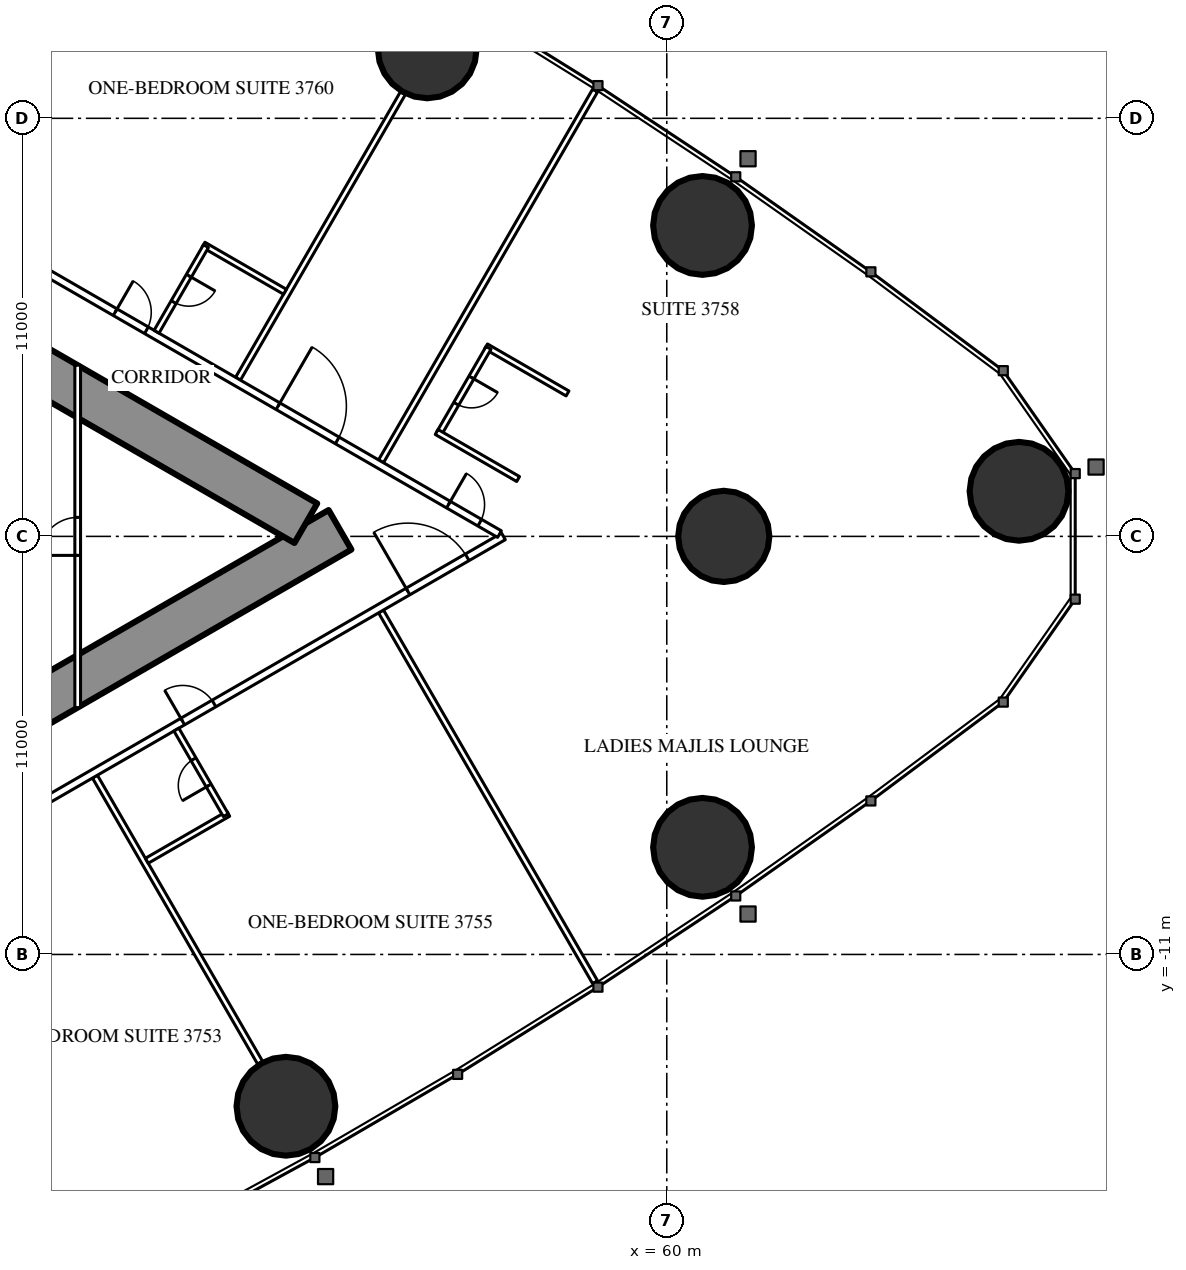
"""IFC4 building model, lengths in metres.
Left out: names, types, materials, properties, quantities, classifications, styles, units other than length and angle.
Written with IfcOpenShell. Run it as: python <this file> out.ifc"""

import sys

from ifc_helpers import new_model, si_unit, direction, frame, frame_2d, origin, origin_2d, place, context, subcontext, project, spatial, rectangle, circle, hollow_circle, extrude, element, fill, save


model = new_model("IFC4")
c1 = context("Model", 3, precision=1e-05, world=origin(), true_north=direction((0.0, 1.0)))
c2 = subcontext(c1, "Body", "Model", "MODEL_VIEW")
j1 = project(units=[si_unit("LENGTHUNIT", "METRE"), si_unit("PLANEANGLEUNIT", "RADIAN")], contexts=[c1])
p1 = place(None, origin())
s1 = spatial("IfcSite", under=j1, at=p1, CompositionType="ELEMENT")
p2 = place(p1, origin())
s2 = spatial("IfcBuilding", under=s1, at=p2, CompositionType="ELEMENT")
p3 = place(p2, frame((0.0, 0.0, 139.6)))
s3 = spatial("IfcBuildingStorey", under=s2, at=p3, CompositionType="ELEMENT", Elevation=139.6)
for number, where, z_axis, x_axis in (
    (1, (69.269, 1.187, 0.0), (0.0, 0.0, 1.0), (1.0, 0.0, 0.0)),
    (2, (60.941, 8.181, 0.0), (0.0, 0.0, 1.0), (1.0, 0.0, 0.0)),
    (3, (53.697, 12.827, 0.0), (0.0, 0.0, 1.0), (1.0, 0.0, 0.0)),
    (4, (49.979, -14.994, 0.0), (0.0, 0.0, 1.0), (1.0, 0.0, 0.0)),
    (5, (60.941, -8.181, 0.0), (0.0, 0.0, 1.0), (1.0, 0.0, 0.0)),
):
    element("IfcColumn", number, at=place(p3, frame(where, z_axis=z_axis, x_axis=x_axis)), inside=s3, PredefinedType="COLUMN", context=c2, shape_type="SweptSolid", body=[
        extrude(hollow_circle(Radius=1.3, WallThickness=0.1, at=origin_2d()), origin(), (0.0, 0.0, 1.0), 3.5),
    ])
p4 = place(p3, frame((61.5, 0.0, 0.0), z_axis=(0.0, 0.0, 1.0), x_axis=(1.0, 0.0, 0.0)))
e6 = element("IfcColumn", 6, at=p4, inside=s3, PredefinedType="COLUMN", context=c2, shape_type="SweptSolid", body=[
    extrude(circle(Radius=1.2, at=origin_2d()), origin(), (0.0, 0.0, 1.0), 3.5),
])
p5 = place(p3, frame((27.2, -13.8, 0.0), z_axis=(0.0, 0.0, 1.0), x_axis=(0.866027159892, 0.499996958321, 0.0)))
e7 = element("IfcWall", 7, at=p5, inside=s3, PredefinedType="SHEAR", context=c2, shape_type="SweptSolid", body=[
    extrude(rectangle(XDim=27.947, YDim=1.2, at=frame_2d((13.973, 0.0))), origin(), (0.0, 0.0, 1.0), 3.5),
])
p6 = place(p5, frame((4.6, 0.0, 0.0)))
e8 = element("IfcOpeningElement", 8, at=p6, cuts=e7, PredefinedType="OPENING", context=c2, shape_type="SweptSolid", body=[
    extrude(rectangle(XDim=1.0, YDim=2.2, at=frame_2d((0.5, 1.1))), frame((0.0, 0.61, 0.0), z_axis=(0.0, -1.0, 0.0), x_axis=(1.0, 0.0, 0.0)), (0.0, 0.0, 1.0), 1.22),
])
p7 = place(p5, frame((13.395, 0.0, 0.0)))
e9 = element("IfcOpeningElement", 9, at=p7, cuts=e7, PredefinedType="OPENING", context=c2, shape_type="SweptSolid", body=[
    extrude(rectangle(XDim=1.8, YDim=2.2, at=frame_2d((0.9, 1.1))), frame((0.0, 0.61, 0.0), z_axis=(0.0, -1.0, 0.0), x_axis=(1.0, 0.0, 0.0)), (0.0, 0.0, 1.0), 1.22),
])
p8 = place(p3, frame((27.2, 13.8, 0.0), z_axis=(0.0, 0.0, 1.0), x_axis=(0.866024515034, -0.500001539357, 0.0)))
e10 = element("IfcWall", 10, at=p8, inside=s3, PredefinedType="SHEAR", context=c2, shape_type="SweptSolid", body=[
    extrude(rectangle(XDim=26.907, YDim=1.2, at=frame_2d((13.454, 0.0))), origin(), (0.0, 0.0, 1.0), 3.5),
])
p9 = place(p8, frame((4.6, 0.0, 0.0)))
e11 = element("IfcOpeningElement", 11, at=p9, cuts=e10, PredefinedType="OPENING", context=c2, shape_type="SweptSolid", body=[
    extrude(rectangle(XDim=1.0, YDim=2.2, at=frame_2d((0.5, 1.1))), frame((0.0, 0.61, 0.0), z_axis=(0.0, -1.0, 0.0), x_axis=(1.0, 0.0, 0.0)), (0.0, 0.0, 1.0), 1.22),
])
p10 = place(p8, frame((13.395, 0.0, 0.0)))
e12 = element("IfcOpeningElement", 12, at=p10, cuts=e10, PredefinedType="OPENING", context=c2, shape_type="SweptSolid", body=[
    extrude(rectangle(XDim=1.8, YDim=2.2, at=frame_2d((0.9, 1.1))), frame((0.0, 0.61, 0.0), z_axis=(0.0, -1.0, 0.0), x_axis=(1.0, 0.0, 0.0)), (0.0, 0.0, 1.0), 1.22),
])
p11 = place(p3, frame((44.954, -6.321, 0.0), z_axis=(0.0, 0.0, 1.0), x_axis=(0.500018676722, -0.866014620505, 0.0)))
e13 = element("IfcWall", 13, at=p11, inside=s3, PredefinedType="PARTITIONING", context=c2, shape_type="SweptSolid", body=[
    extrude(rectangle(XDim=8.704, YDim=0.15, at=frame_2d((4.352, 0.0))), origin(), (0.0, 0.0, 1.0), 2.2),
])
p12 = place(p3, frame((52.481, -1.975, 0.0), z_axis=(0.0, 0.0, 1.0), x_axis=(0.500003867771, -0.866023170714, 0.0)))
e14 = element("IfcWall", 14, at=p12, inside=s3, PredefinedType="PARTITIONING", context=c2, shape_type="SweptSolid", body=[
    extrude(rectangle(XDim=11.265, YDim=0.15, at=frame_2d((5.632, 0.0))), origin(), (0.0, 0.0, 1.0), 3.25),
])
p13 = place(p3, frame((41.19, 8.494, 0.0), z_axis=(0.0, 0.0, 1.0), x_axis=(0.49999258054, 0.866029687369, 0.0)))
e15 = element("IfcWall", 15, at=p13, inside=s3, PredefinedType="PARTITIONING", context=c2, shape_type="SweptSolid", body=[
    extrude(rectangle(XDim=11.318, YDim=0.15, at=frame_2d((5.659, 0.0))), origin(), (0.0, 0.0, 1.0), 3.25),
])
p14 = place(p3, frame((48.719, 4.147, 0.0), z_axis=(0.0, 0.0, 1.0), x_axis=(0.499993328235, 0.866029255696, 0.0)))
e16 = element("IfcWall", 16, at=p14, inside=s3, PredefinedType="PARTITIONING", context=c2, shape_type="SweptSolid", body=[
    extrude(rectangle(XDim=8.686, YDim=0.15, at=frame_2d((4.343, 0.0))), origin(), (0.0, 0.0, 1.0), 2.2),
])
p15 = place(p3, frame((52.481, 1.975, 0.0), z_axis=(0.0, 0.0, 1.0), x_axis=(0.500003867771, 0.866023170714, 0.0)))
e17 = element("IfcWall", 17, at=p15, inside=s3, PredefinedType="PARTITIONING", context=c2, shape_type="SweptSolid", body=[
    extrude(rectangle(XDim=11.265, YDim=0.15, at=frame_2d((5.632, 0.0))), origin(), (0.0, 0.0, 1.0), 3.25),
])
p16 = place(p3, frame((37.96, -10.243, 0.0), z_axis=(0.0, 0.0, 1.0), x_axis=(0.866026429433, 0.499998223521, 0.0)))
e18 = element("IfcWall", 18, at=p16, inside=s3, PredefinedType="PARTITIONING", context=c2, shape_type="SweptSolid", body=[
    extrude(rectangle(XDim=20.487, YDim=0.2, at=frame_2d((10.243, 0.0))), origin(), (0.0, 0.0, 1.0), 3.25),
])
p17 = place(p16, frame((10.743, 0.0, 0.0)))
e19 = element("IfcOpeningElement", 19, at=p17, cuts=e18, PredefinedType="OPENING", context=c2, shape_type="SweptSolid", body=[
    extrude(rectangle(XDim=0.95, YDim=2.2, at=frame_2d((0.475, 1.1))), frame((0.0, 0.11, 0.0), z_axis=(0.0, -1.0, 0.0), x_axis=(1.0, 0.0, 0.0)), (0.0, 0.0, 1.0), 0.22),
])
p18 = place(p16, frame((17.586, 0.0, 0.0)))
e20 = element("IfcOpeningElement", 20, at=p18, cuts=e18, PredefinedType="OPENING", context=c2, shape_type="SweptSolid", body=[
    extrude(rectangle(XDim=1.8, YDim=2.2, at=frame_2d((0.9, 1.1))), frame((0.0, 0.11, 0.0), z_axis=(0.0, -1.0, 0.0), x_axis=(1.0, 0.0, 0.0)), (0.0, 0.0, 1.0), 0.22),
])
p19 = place(p16, frame((0.6, 0.0, 0.0)))
e21 = element("IfcOpeningElement", 21, at=p19, cuts=e18, PredefinedType="OPENING", context=c2, shape_type="SweptSolid", body=[
    extrude(rectangle(XDim=0.95, YDim=2.2, at=frame_2d((0.475, 1.1))), frame((0.0, 0.11, 0.0), z_axis=(0.0, -1.0, 0.0), x_axis=(1.0, 0.0, 0.0)), (0.0, 0.0, 1.0), 0.22),
])
p20 = place(p3, frame((36.834, 10.894, 0.0), z_axis=(0.0, 0.0, 1.0), x_axis=(0.866028157229, -0.499995230863, 0.0)))
e22 = element("IfcWall", 22, at=p20, inside=s3, PredefinedType="PARTITIONING", context=c2, shape_type="SweptSolid", body=[
    extrude(rectangle(XDim=21.667, YDim=0.2, at=frame_2d((10.833, 0.0))), origin(), (0.0, 0.0, 1.0), 3.25),
])
p21 = place(p20, frame((20.117, 0.0, 0.0)))
e23 = element("IfcOpeningElement", 23, at=p21, cuts=e22, PredefinedType="OPENING", context=c2, shape_type="SweptSolid", body=[
    extrude(rectangle(XDim=0.95, YDim=2.2, at=frame_2d((0.475, 1.1))), frame((0.0, 0.11, 0.0), z_axis=(0.0, -1.0, 0.0), x_axis=(1.0, 0.0, 0.0)), (0.0, 0.0, 1.0), 0.22),
])
p22 = place(p20, frame((14.938, 0.0, 0.0)))
e24 = element("IfcOpeningElement", 24, at=p22, cuts=e22, PredefinedType="OPENING", context=c2, shape_type="SweptSolid", body=[
    extrude(rectangle(XDim=1.8, YDim=2.2, at=frame_2d((0.9, 1.1))), frame((0.0, 0.11, 0.0), z_axis=(0.0, -1.0, 0.0), x_axis=(1.0, 0.0, 0.0)), (0.0, 0.0, 1.0), 0.22),
])
p23 = place(p20, frame((9.99, 0.0, 0.0)))
e25 = element("IfcOpeningElement", 25, at=p23, cuts=e22, PredefinedType="OPENING", context=c2, shape_type="SweptSolid", body=[
    extrude(rectangle(XDim=0.95, YDim=2.2, at=frame_2d((0.475, 1.1))), frame((0.0, 0.11, 0.0), z_axis=(0.0, -1.0, 0.0), x_axis=(1.0, 0.0, 0.0)), (0.0, 0.0, 1.0), 0.22),
])
p24 = place(p20, frame((3.35, 0.0, 0.0)))
e26 = element("IfcOpeningElement", 26, at=p24, cuts=e22, PredefinedType="OPENING", context=c2, shape_type="SweptSolid", body=[
    extrude(rectangle(XDim=1.0, YDim=2.2, at=frame_2d((0.5, 1.1))), frame((0.0, 0.11, 0.0), z_axis=(0.0, -1.0, 0.0), x_axis=(1.0, 0.0, 0.0)), (0.0, 0.0, 1.0), 0.22),
])
p25 = place(p3, frame((46.319, -8.535, 0.0), z_axis=(0.0, 0.0, 1.0), x_axis=(0.866006523861, 0.500032699561, 0.0)))
e27 = element("IfcWall", 27, at=p25, inside=s3, PredefinedType="PARTITIONING", context=c2, shape_type="SweptSolid", body=[
    extrude(rectangle(XDim=2.475, YDim=0.15, at=frame_2d((1.237, 0.0))), origin(), (0.0, 0.0, 1.0), 3.25),
])
p26 = place(p3, frame((47.097, -5.084, 0.0), z_axis=(0.0, 0.0, 1.0), x_axis=(0.500006934395, -0.866021400173, 0.0)))
e28 = element("IfcWall", 28, at=p26, inside=s3, PredefinedType="PARTITIONING", context=c2, shape_type="SweptSolid", body=[
    extrude(rectangle(XDim=2.6, YDim=0.15, at=frame_2d((1.3, 0.0))), origin(), (0.0, 0.0, 1.0), 3.25),
])
p27 = place(p26, frame((0.9, 0.0, 0.0)))
e29 = element("IfcOpeningElement", 29, at=p27, cuts=e28, PredefinedType="OPENING", context=c2, shape_type="SweptSolid", body=[
    extrude(rectangle(XDim=0.8, YDim=2.2, at=frame_2d((0.4, 1.1))), frame((0.0, 0.085, 0.0), z_axis=(0.0, -1.0, 0.0), x_axis=(1.0, 0.0, 0.0)), (0.0, 0.0, 1.0), 0.17),
])
p28 = place(p3, frame((55.245, 4.998, 0.0), z_axis=(0.0, 0.0, 1.0), x_axis=(0.866006523861, -0.500032699561, 0.0)))
e30 = element("IfcWall", 30, at=p28, inside=s3, PredefinedType="PARTITIONING", context=c2, shape_type="SweptSolid", body=[
    extrude(rectangle(XDim=2.475, YDim=0.15, at=frame_2d((1.237, 0.0))), origin(), (0.0, 0.0, 1.0), 3.25),
])
p29 = place(p3, frame((54.01, 2.709, 0.0), z_axis=(0.0, 0.0, 1.0), x_axis=(0.500006934395, 0.866021400173, 0.0)))
e31 = element("IfcWall", 31, at=p29, inside=s3, PredefinedType="PARTITIONING", context=c2, shape_type="SweptSolid", body=[
    extrude(rectangle(XDim=2.6, YDim=0.15, at=frame_2d((1.3, 0.0))), origin(), (0.0, 0.0, 1.0), 3.25),
])
p30 = place(p29, frame((0.9, 0.0, 0.0)))
e32 = element("IfcOpeningElement", 32, at=p30, cuts=e31, PredefinedType="OPENING", context=c2, shape_type="SweptSolid", body=[
    extrude(rectangle(XDim=0.8, YDim=2.2, at=frame_2d((0.4, 1.1))), frame((0.0, 0.085, 0.0), z_axis=(0.0, -1.0, 0.0), x_axis=(1.0, 0.0, 0.0)), (0.0, 0.0, 1.0), 0.17),
])
for number, where, z_axis, x_axis in (
    (33, (53.945, 2.747, 0.0), (0.0, 0.0, 1.0), (0.866, -0.5, 0.0)),
    (34, (47.81, 7.674, 0.0), (0.0, 0.0, 1.0), (0.866, -0.5, 0.0)),
):
    element("IfcWall", number, at=place(p3, frame(where, z_axis=z_axis, x_axis=x_axis)), inside=s3, PredefinedType="PARTITIONING", context=c2, shape_type="SweptSolid", body=[
        extrude(rectangle(XDim=2.475, YDim=0.15, at=frame_2d((1.238, 0.0))), origin(), (0.0, 0.0, 1.0), 3.25),
    ])
p31 = place(p3, frame((46.575, 5.385, 0.0), z_axis=(0.0, 0.0, 1.0), x_axis=(0.500006934395, 0.866021400173, 0.0)))
e35 = element("IfcWall", 35, at=p31, inside=s3, PredefinedType="PARTITIONING", context=c2, shape_type="SweptSolid", body=[
    extrude(rectangle(XDim=2.6, YDim=0.15, at=frame_2d((1.3, 0.0))), origin(), (0.0, 0.0, 1.0), 3.25),
])
p32 = place(p31, frame((0.9, 0.0, 0.0)))
e36 = element("IfcOpeningElement", 36, at=p32, cuts=e35, PredefinedType="OPENING", context=c2, shape_type="SweptSolid", body=[
    extrude(rectangle(XDim=0.8, YDim=2.2, at=frame_2d((0.4, 1.1))), frame((0.0, 0.085, 0.0), z_axis=(0.0, -1.0, 0.0), x_axis=(1.0, 0.0, 0.0)), (0.0, 0.0, 1.0), 0.17),
])
p33 = place(p3, frame((44.5, -4.505, 0.0), z_axis=(0.0, 0.0, 1.0), x_axis=(0.0, 1.0, 0.0)))
e37 = element("IfcWall", 37, at=p33, inside=s3, PredefinedType="PARTITIONING", context=c2, shape_type="SweptSolid", body=[
    extrude(rectangle(XDim=9.009, YDim=0.15, at=frame_2d((4.505, 0.0))), origin(), (0.0, 0.0, 1.0), 2.45),
])
p34 = place(p33, frame((4.005, 0.0, 0.0)))
e38 = element("IfcOpeningElement", 38, at=p34, cuts=e37, PredefinedType="OPENING", context=c2, shape_type="SweptSolid", body=[
    extrude(rectangle(XDim=1.0, YDim=2.2, at=frame_2d((0.5, 1.1))), frame((0.0, 0.085, 0.0), z_axis=(0.0, -1.0, 0.0), x_axis=(1.0, 0.0, 0.0)), (0.0, 0.0, 1.0), 0.17),
])
p35 = place(p27, origin())
e39 = element("IfcDoor", 39, at=p35, inside=s3, OperationType="SINGLE_SWING_RIGHT", PredefinedType="DOOR", context=c2, shape_type="SweptSolid", body=[
    extrude(rectangle(XDim=0.8, YDim=2.2, at=frame_2d((0.4, 1.1))), frame((0.0, 0.025, 0.0), z_axis=(0.0, -1.0, 0.0), x_axis=(1.0, 0.0, 0.0)), (0.0, 0.0, 1.0), 0.05),
])
fill(e29, e39)
p36 = place(p17, origin())
e40 = element("IfcDoor", 40, at=p36, inside=s3, OperationType="SINGLE_SWING_LEFT", PredefinedType="DOOR", context=c2, shape_type="SweptSolid", body=[
    extrude(rectangle(XDim=0.95, YDim=2.2, at=frame_2d((0.475, 1.1))), frame((0.0, 0.025, 0.0), z_axis=(0.0, -1.0, 0.0), x_axis=(1.0, 0.0, 0.0)), (0.0, 0.0, 1.0), 0.05),
])
fill(e19, e40)
p37 = place(p18, origin())
e41 = element("IfcDoor", 41, at=p37, inside=s3, OperationType="DOUBLE_DOOR_SINGLE_SWING", PredefinedType="DOOR", context=c2, shape_type="SweptSolid", body=[
    extrude(rectangle(XDim=1.8, YDim=2.2, at=frame_2d((0.9, 1.1))), frame((0.0, 0.025, 0.0), z_axis=(0.0, -1.0, 0.0), x_axis=(1.0, 0.0, 0.0)), (0.0, 0.0, 1.0), 0.05),
])
fill(e20, e41)
p38 = place(p30, origin())
e42 = element("IfcDoor", 42, at=p38, inside=s3, OperationType="SINGLE_SWING_RIGHT", PredefinedType="DOOR", context=c2, shape_type="SweptSolid", body=[
    extrude(rectangle(XDim=0.8, YDim=2.2, at=frame_2d((0.4, 1.1))), frame((0.0, 0.025, 0.0), z_axis=(0.0, -1.0, 0.0), x_axis=(1.0, 0.0, 0.0)), (0.0, 0.0, 1.0), 0.05),
])
fill(e32, e42)
p39 = place(p21, origin())
e43 = element("IfcDoor", 43, at=p39, inside=s3, OperationType="SINGLE_SWING_LEFT", PredefinedType="DOOR", context=c2, shape_type="SweptSolid", body=[
    extrude(rectangle(XDim=0.95, YDim=2.2, at=frame_2d((0.475, 1.1))), frame((0.0, 0.025, 0.0), z_axis=(0.0, -1.0, 0.0), x_axis=(1.0, 0.0, 0.0)), (0.0, 0.0, 1.0), 0.05),
])
fill(e23, e43)
p40 = place(p22, origin())
e44 = element("IfcDoor", 44, at=p40, inside=s3, OperationType="DOUBLE_DOOR_SINGLE_SWING", PredefinedType="DOOR", context=c2, shape_type="SweptSolid", body=[
    extrude(rectangle(XDim=1.8, YDim=2.2, at=frame_2d((0.9, 1.1))), frame((0.0, 0.025, 0.0), z_axis=(0.0, -1.0, 0.0), x_axis=(1.0, 0.0, 0.0)), (0.0, 0.0, 1.0), 0.05),
])
fill(e24, e44)
p41 = place(p32, origin())
e45 = element("IfcDoor", 45, at=p41, inside=s3, OperationType="SINGLE_SWING_RIGHT", PredefinedType="DOOR", context=c2, shape_type="SweptSolid", body=[
    extrude(rectangle(XDim=0.8, YDim=2.2, at=frame_2d((0.4, 1.1))), frame((0.0, 0.025, 0.0), z_axis=(0.0, -1.0, 0.0), x_axis=(1.0, 0.0, 0.0)), (0.0, 0.0, 1.0), 0.05),
])
fill(e36, e45)
p42 = place(p23, origin())
e46 = element("IfcDoor", 46, at=p42, inside=s3, OperationType="SINGLE_SWING_LEFT", PredefinedType="DOOR", context=c2, shape_type="SweptSolid", body=[
    extrude(rectangle(XDim=0.95, YDim=2.2, at=frame_2d((0.475, 1.1))), frame((0.0, 0.025, 0.0), z_axis=(0.0, -1.0, 0.0), x_axis=(1.0, 0.0, 0.0)), (0.0, 0.0, 1.0), 0.05),
])
fill(e25, e46)
p43 = place(p34, origin())
e47 = element("IfcDoor", 47, at=p43, inside=s3, OperationType="SINGLE_SWING_LEFT", PredefinedType="DOOR", context=c2, shape_type="SweptSolid", body=[
    extrude(rectangle(XDim=1.0, YDim=2.2, at=frame_2d((0.5, 1.1))), frame((0.0, 0.025, 0.0), z_axis=(0.0, -1.0, 0.0), x_axis=(1.0, 0.0, 0.0)), (0.0, 0.0, 1.0), 0.05),
])
fill(e38, e47)
save(model, sys.argv[1])
